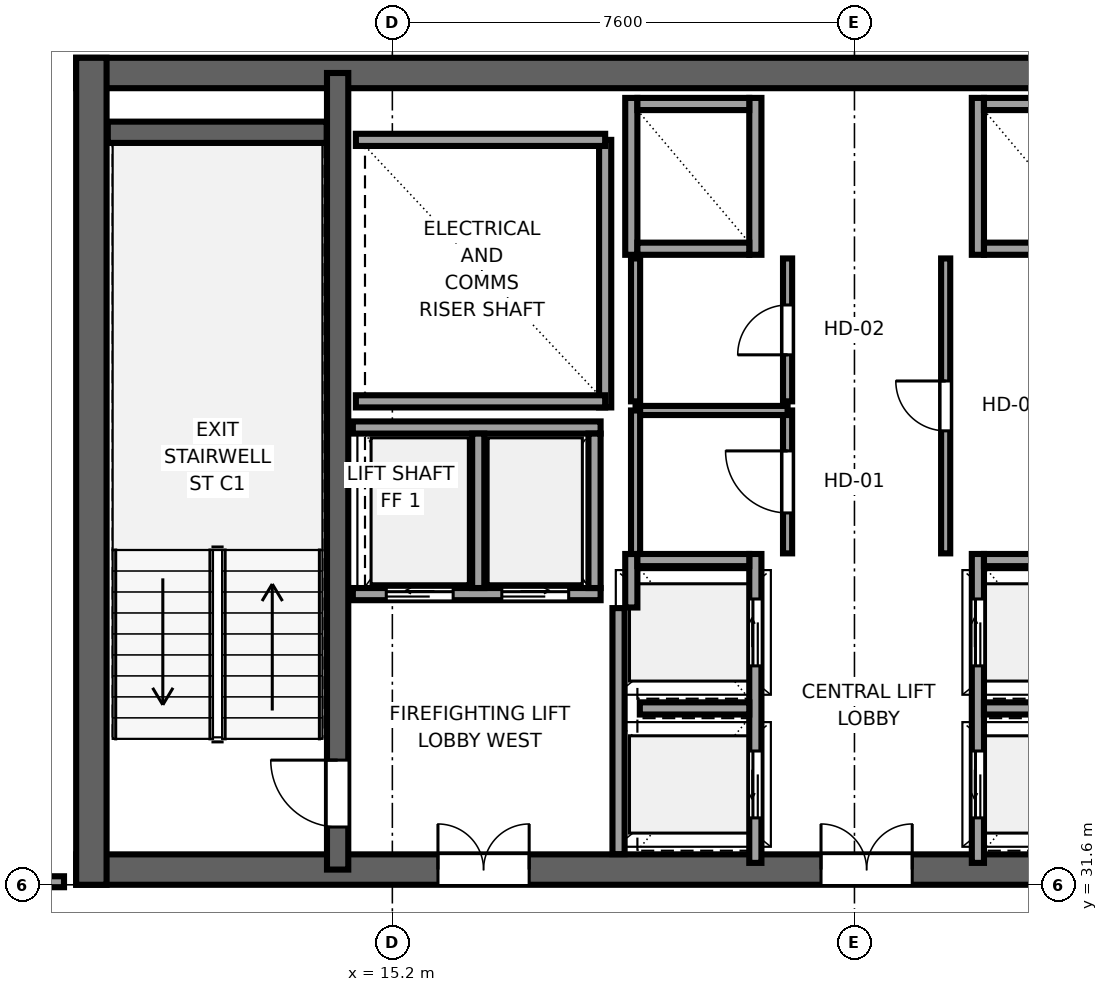
"""IFC4 building model, lengths in metres.
Left out: names, types, materials, properties, quantities, classifications, styles, units other than length and angle.
Written with IfcOpenShell. Run it as: python <this file> out.ifc"""

import sys

from ifc_helpers import new_model, si_unit, direction, frame, frame_2d, origin, place, context, subcontext, project, spatial, rectangle, extrude, source, transform, mapped, element, fill, save


model = new_model("IFC4")
c1 = context("Model", 3, precision=1e-05, world=origin(), true_north=direction((0.0, 1.0)))
c2 = subcontext(c1, "Body", "Model", "MODEL_VIEW")
j1 = project(units=[si_unit("LENGTHUNIT", "METRE"), si_unit("PLANEANGLEUNIT", "RADIAN")], contexts=[c1])
p1 = place(None, origin())
s1 = spatial("IfcSite", under=j1, at=p1, CompositionType="ELEMENT")
p2 = place(p1, origin())
s2 = spatial("IfcBuilding", under=s1, at=p2, CompositionType="ELEMENT")
p3 = place(p2, frame((0.0, 0.0, 223.9)))
s3 = spatial("IfcBuildingStorey", under=s2, at=p3, CompositionType="ELEMENT", Elevation=223.9)
p4 = place(p3, frame((10.0, 31.85, 0.0), z_axis=(0.0, 0.0, 1.0), x_axis=(1.0, 0.0, 0.0)))
e1 = element("IfcWall", 1, at=p4, inside=s3, PredefinedType="SHEAR", context=c2, shape_type="SweptSolid", body=[
    extrude(rectangle(XDim=26.0, YDim=0.5, at=frame_2d((13.0, 0.0))), origin(), (0.0, 0.0, 1.0), 3.55),
])
p5 = place(p4, frame((7.45, 0.0, 0.0), z_axis=(0.0, 0.0, 1.0), x_axis=(-1.0, 0.0, 0.0)))
e2 = element("IfcOpeningElement", 2, at=p5, cuts=e1, PredefinedType="OPENING", context=c2, shape_type="SweptSolid", body=[
    extrude(rectangle(XDim=1.5, YDim=2.04, at=frame_2d((0.75, 1.02))), frame((0.0, 0.26, 0.0), z_axis=(0.0, -1.0, 0.0), x_axis=(1.0, 0.0, 0.0)), (0.0, 0.0, 1.0), 0.52),
])
p6 = place(p4, frame((13.75, 0.0, 0.0), z_axis=(0.0, 0.0, 1.0), x_axis=(-1.0, 0.0, 0.0)))
e3 = element("IfcOpeningElement", 3, at=p6, cuts=e1, PredefinedType="OPENING", context=c2, shape_type="SweptSolid", body=[
    extrude(rectangle(XDim=1.5, YDim=2.04, at=frame_2d((0.75, 1.02))), frame((0.0, 0.26, 0.0), z_axis=(0.0, -1.0, 0.0), x_axis=(1.0, 0.0, 0.0)), (0.0, 0.0, 1.0), 0.52),
])
p7 = place(p4, frame((20.05, 0.0, 0.0), z_axis=(0.0, 0.0, 1.0), x_axis=(-1.0, 0.0, 0.0)))
e4 = element("IfcOpeningElement", 4, at=p7, cuts=e1, PredefinedType="OPENING", context=c2, shape_type="SweptSolid", body=[
    extrude(rectangle(XDim=1.5, YDim=2.04, at=frame_2d((0.75, 1.02))), frame((0.0, 0.26, 0.0), z_axis=(0.0, -1.0, 0.0), x_axis=(1.0, 0.0, 0.0)), (0.0, 0.0, 1.0), 0.52),
])
p8 = place(p3, frame((10.0, 44.95, 0.0), z_axis=(0.0, 0.0, 1.0), x_axis=(1.0, 0.0, 0.0)))
e5 = element("IfcWall", 5, at=p8, inside=s3, PredefinedType="SHEAR", context=c2, shape_type="SweptSolid", body=[
    extrude(rectangle(XDim=26.0, YDim=0.5, at=frame_2d((13.0, 0.0))), origin(), (0.0, 0.0, 1.0), 3.55),
])
p9 = place(p3, frame((10.25, 31.6, 0.0), z_axis=(0.0, 0.0, 1.0), x_axis=(0.0, 1.0, 0.0)))
e6 = element("IfcWall", 6, at=p9, inside=s3, PredefinedType="SHEAR", context=c2, shape_type="SweptSolid", body=[
    extrude(rectangle(XDim=13.6, YDim=0.5, at=frame_2d((6.8, 0.0))), origin(), (0.0, 0.0, 1.0), 3.55),
])
p10 = place(p3, frame((14.3, 31.85, 0.0), z_axis=(0.0, 0.0, 1.0), x_axis=(0.0, 1.0, 0.0)))
e7 = element("IfcWall", 7, at=p10, inside=s3, PredefinedType="SHEAR", context=c2, shape_type="SweptSolid", body=[
    extrude(rectangle(XDim=13.1, YDim=0.35, at=frame_2d((6.55, 0.0))), origin(), (0.0, 0.0, 1.0), 3.55),
])
p11 = place(p10, frame((0.7, 0.0, 0.0)))
e8 = element("IfcOpeningElement", 8, at=p11, cuts=e7, PredefinedType="OPENING", context=c2, shape_type="SweptSolid", body=[
    extrude(rectangle(XDim=1.1, YDim=2.12, at=frame_2d((0.55, 1.06))), frame((0.0, 0.185, 0.0), z_axis=(0.0, -1.0, 0.0), x_axis=(1.0, 0.0, 0.0)), (0.0, 0.0, 1.0), 0.37),
])
p12 = place(p3, frame((10.52, 43.975, 0.0), z_axis=(0.0, 0.0, 1.0), x_axis=(1.0, 0.0, 0.0)))
e9 = element("IfcWall", 9, at=p12, inside=s3, PredefinedType="SHEAR", context=c2, shape_type="SweptSolid", body=[
    extrude(rectangle(XDim=3.6, YDim=0.35, at=frame_2d((1.8, 0.0))), origin(), (0.0, 0.0, 1.0), 3.55),
])
p13 = place(p3, frame((18.7, 39.45, 0.0), z_axis=(0.0, 0.0, 1.0), x_axis=(0.0, 1.0, 0.0)))
e10 = element("IfcWall", 10, at=p13, inside=s3, PredefinedType="SOLIDWALL", context=c2, shape_type="SweptSolid", body=[
    extrude(rectangle(XDim=4.4, YDim=0.2, at=frame_2d((2.2, 0.0))), origin(), (0.0, 0.0, 1.0), 3.37),
])
for number, where, z_axis, x_axis in (
    (11, (14.6, 39.55, 0.0), (0.0, 0.0, 1.0), (1.0, 0.0, 0.0)),
    (12, (14.6, 43.85, 0.0), (0.0, 0.0, 1.0), (1.0, 0.0, 0.0)),
):
    element("IfcWall", number, at=place(p3, frame(where, z_axis=z_axis, x_axis=x_axis)), inside=s3, PredefinedType="SOLIDWALL", context=c2, shape_type="SweptSolid", body=[
        extrude(rectangle(XDim=4.1, YDim=0.2, at=frame_2d((2.05, 0.0))), origin(), (0.0, 0.0, 1.0), 3.37),
    ])
p14 = place(p3, frame((18.92, 32.104, 0.0), z_axis=(0.0, 0.0, 1.0), x_axis=(0.0, 1.0, 0.0)))
e13 = element("IfcWall", 13, at=p14, inside=s3, PredefinedType="SOLIDWALL", context=c2, shape_type="SweptSolid", body=[
    extrude(rectangle(XDim=4.046, YDim=0.2, at=frame_2d((2.023, 0.0))), origin(), (0.0, 0.0, 1.0), 3.37),
])
p15 = place(p3, frame((21.17, 31.96, 0.0), z_axis=(0.0, 0.0, 1.0), x_axis=(0.0, 1.0, 0.0)))
e14 = element("IfcWall", 14, at=p15, inside=s3, PredefinedType="SOLIDWALL", context=c2, shape_type="SweptSolid", body=[
    extrude(rectangle(XDim=5.08, YDim=0.2, at=frame_2d((2.54, 0.0))), origin(), (0.0, 0.0, 1.0), 3.37),
])
p16 = place(p15, frame((0.74, 0.0, 0.0)))
e15 = element("IfcOpeningElement", 15, at=p16, cuts=e14, PredefinedType="OPENING", context=c2, shape_type="SweptSolid", body=[
    extrude(rectangle(XDim=1.1, YDim=2.12, at=frame_2d((0.55, 1.06))), frame((0.0, 0.11, 0.0), z_axis=(0.0, -1.0, 0.0), x_axis=(1.0, 0.0, 0.0)), (0.0, 0.0, 1.0), 0.22),
])
p17 = place(p15, frame((3.24, 0.0, 0.0)))
e16 = element("IfcOpeningElement", 16, at=p17, cuts=e14, PredefinedType="OPENING", context=c2, shape_type="SweptSolid", body=[
    extrude(rectangle(XDim=1.1, YDim=2.12, at=frame_2d((0.55, 1.06))), frame((0.0, 0.11, 0.0), z_axis=(0.0, -1.0, 0.0), x_axis=(1.0, 0.0, 0.0)), (0.0, 0.0, 1.0), 0.22),
])
p18 = place(p3, frame((19.13, 36.16, 0.0), z_axis=(0.0, 0.0, 1.0), x_axis=(0.0, 1.0, 0.0)))
e17 = element("IfcWall", 17, at=p18, inside=s3, PredefinedType="SOLIDWALL", context=c2, shape_type="SweptSolid", body=[
    extrude(rectangle(XDim=0.88, YDim=0.2, at=frame_2d((0.44, 0.0))), origin(), (0.0, 0.0, 1.0), 3.37),
])
p19 = place(p3, frame((19.23, 36.94, 0.0), z_axis=(0.0, 0.0, 1.0), x_axis=(1.0, 0.0, 0.0)))
e18 = element("IfcWall", 18, at=p19, inside=s3, PredefinedType="SOLIDWALL", context=c2, shape_type="SweptSolid", body=[
    extrude(rectangle(XDim=1.84, YDim=0.2, at=frame_2d((0.92, 0.0))), origin(), (0.0, 0.0, 1.0), 3.37),
])
p20 = place(p3, frame((19.27, 34.5, 0.0), z_axis=(0.0, 0.0, 1.0), x_axis=(1.0, 0.0, 0.0)))
e19 = element("IfcWall", 19, at=p20, inside=s3, PredefinedType="SOLIDWALL", context=c2, shape_type="SweptSolid", body=[
    extrude(rectangle(XDim=1.8, YDim=0.2, at=frame_2d((0.9, 0.0))), origin(), (0.0, 0.0, 1.0), 3.37),
])
for number, where, z_axis, x_axis in (
    (20, (21.17, 41.96, 0.0), (0.0, 0.0, 1.0), (0.0, 1.0, 0.0)),
    (21, (19.13, 41.96, 0.0), (0.0, 0.0, 1.0), (0.0, 1.0, 0.0)),
):
    element("IfcWall", number, at=place(p3, frame(where, z_axis=z_axis, x_axis=x_axis)), inside=s3, PredefinedType="SOLIDWALL", context=c2, shape_type="SweptSolid", body=[
        extrude(rectangle(XDim=2.58, YDim=0.2, at=frame_2d((1.29, 0.0))), origin(), (0.0, 0.0, 1.0), 3.37),
    ])
for number, where, z_axis, x_axis in (
    (22, (19.23, 42.06, 0.0), (0.0, 0.0, 1.0), (1.0, 0.0, 0.0)),
    (23, (19.23, 44.44, 0.0), (0.0, 0.0, 1.0), (1.0, 0.0, 0.0)),
):
    element("IfcWall", number, at=place(p3, frame(where, z_axis=z_axis, x_axis=x_axis)), inside=s3, PredefinedType="SOLIDWALL", context=c2, shape_type="SweptSolid", body=[
        extrude(rectangle(XDim=1.84, YDim=0.2, at=frame_2d((0.92, 0.0))), origin(), (0.0, 0.0, 1.0), 3.37),
    ])
p21 = place(p3, frame((14.55, 36.38, 0.0), z_axis=(0.0, 0.0, 1.0), x_axis=(1.0, 0.0, 0.0)))
e24 = element("IfcWall", 24, at=p21, inside=s3, PredefinedType="SOLIDWALL", context=c2, shape_type="SweptSolid", body=[
    extrude(rectangle(XDim=4.075, YDim=0.2, at=frame_2d((2.038, 0.0))), origin(), (0.0, 0.0, 1.0), 3.37),
])
p22 = place(p21, frame((0.55, 0.0, 0.0)))
e25 = element("IfcOpeningElement", 25, at=p22, cuts=e24, PredefinedType="OPENING", context=c2, shape_type="SweptSolid", body=[
    extrude(rectangle(XDim=1.1, YDim=2.12, at=frame_2d((0.55, 1.06))), frame((0.0, 0.11, 0.0), z_axis=(0.0, -1.0, 0.0), x_axis=(1.0, 0.0, 0.0)), (0.0, 0.0, 1.0), 0.22),
])
p23 = place(p21, frame((2.45, 0.0, 0.0)))
e26 = element("IfcOpeningElement", 26, at=p23, cuts=e24, PredefinedType="OPENING", context=c2, shape_type="SweptSolid", body=[
    extrude(rectangle(XDim=1.1, YDim=2.12, at=frame_2d((0.55, 1.06))), frame((0.0, 0.11, 0.0), z_axis=(0.0, -1.0, 0.0), x_axis=(1.0, 0.0, 0.0)), (0.0, 0.0, 1.0), 0.22),
])
p24 = place(p3, frame((14.55, 39.12, 0.0), z_axis=(0.0, 0.0, 1.0), x_axis=(1.0, 0.0, 0.0)))
e27 = element("IfcWall", 27, at=p24, inside=s3, PredefinedType="SOLIDWALL", context=c2, shape_type="SweptSolid", body=[
    extrude(rectangle(XDim=4.075, YDim=0.2, at=frame_2d((2.038, 0.0))), origin(), (0.0, 0.0, 1.0), 3.37),
])
for number, where, z_axis, x_axis in (
    (28, (18.525, 36.48, 0.0), (0.0, 0.0, 1.0), (0.0, 1.0, 0.0)),
    (29, (16.613, 36.48, 0.0), (0.0, 0.0, 1.0), (0.0, 1.0, 0.0)),
):
    element("IfcWall", number, at=place(p3, frame(where, z_axis=z_axis, x_axis=x_axis)), inside=s3, PredefinedType="SOLIDWALL", context=c2, shape_type="SweptSolid", body=[
        extrude(rectangle(XDim=2.54, YDim=0.2, at=frame_2d((1.27, 0.0))), origin(), (0.0, 0.0, 1.0), 3.37),
    ])
p25 = place(p3, frame((24.83, 31.96, 0.0), z_axis=(0.0, 0.0, 1.0), x_axis=(0.0, 1.0, 0.0)))
e30 = element("IfcWall", 30, at=p25, inside=s3, PredefinedType="SOLIDWALL", context=c2, shape_type="SweptSolid", body=[
    extrude(rectangle(XDim=5.08, YDim=0.2, at=frame_2d((2.54, 0.0))), origin(), (0.0, 0.0, 1.0), 3.37),
])
p26 = place(p25, frame((0.74, 0.0, 0.0)))
e31 = element("IfcOpeningElement", 31, at=p26, cuts=e30, PredefinedType="OPENING", context=c2, shape_type="SweptSolid", body=[
    extrude(rectangle(XDim=1.1, YDim=2.12, at=frame_2d((0.55, 1.06))), frame((0.0, 0.11, 0.0), z_axis=(0.0, -1.0, 0.0), x_axis=(1.0, 0.0, 0.0)), (0.0, 0.0, 1.0), 0.22),
])
p27 = place(p25, frame((3.24, 0.0, 0.0)))
e32 = element("IfcOpeningElement", 32, at=p27, cuts=e30, PredefinedType="OPENING", context=c2, shape_type="SweptSolid", body=[
    extrude(rectangle(XDim=1.1, YDim=2.12, at=frame_2d((0.55, 1.06))), frame((0.0, 0.11, 0.0), z_axis=(0.0, -1.0, 0.0), x_axis=(1.0, 0.0, 0.0)), (0.0, 0.0, 1.0), 0.22),
])
p28 = place(p3, frame((24.93, 36.94, 0.0), z_axis=(0.0, 0.0, 1.0), x_axis=(1.0, 0.0, 0.0)))
e33 = element("IfcWall", 33, at=p28, inside=s3, PredefinedType="SOLIDWALL", context=c2, shape_type="SweptSolid", body=[
    extrude(rectangle(XDim=1.84, YDim=0.2, at=frame_2d((0.92, 0.0))), origin(), (0.0, 0.0, 1.0), 3.37),
])
p29 = place(p3, frame((24.93, 34.5, 0.0), z_axis=(0.0, 0.0, 1.0), x_axis=(1.0, 0.0, 0.0)))
e34 = element("IfcWall", 34, at=p29, inside=s3, PredefinedType="SOLIDWALL", context=c2, shape_type="SweptSolid", body=[
    extrude(rectangle(XDim=1.8, YDim=0.2, at=frame_2d((0.9, 0.0))), origin(), (0.0, 0.0, 1.0), 3.37),
])
p30 = place(p3, frame((24.83, 41.96, 0.0), z_axis=(0.0, 0.0, 1.0), x_axis=(0.0, 1.0, 0.0)))
e35 = element("IfcWall", 35, at=p30, inside=s3, PredefinedType="SOLIDWALL", context=c2, shape_type="SweptSolid", body=[
    extrude(rectangle(XDim=2.58, YDim=0.2, at=frame_2d((1.29, 0.0))), origin(), (0.0, 0.0, 1.0), 3.37),
])
for number, where, z_axis, x_axis in (
    (36, (24.93, 42.06, 0.0), (0.0, 0.0, 1.0), (1.0, 0.0, 0.0)),
    (37, (24.93, 44.44, 0.0), (0.0, 0.0, 1.0), (1.0, 0.0, 0.0)),
):
    element("IfcWall", number, at=place(p3, frame(where, z_axis=z_axis, x_axis=x_axis)), inside=s3, PredefinedType="SOLIDWALL", context=c2, shape_type="SweptSolid", body=[
        extrude(rectangle(XDim=1.84, YDim=0.2, at=frame_2d((0.92, 0.0))), origin(), (0.0, 0.0, 1.0), 3.37),
    ])
p31 = place(p3, frame((21.7, 37.05, 0.0), z_axis=(0.0, 0.0, 1.0), x_axis=(0.0, 1.0, 0.0)))
e38 = element("IfcWall", 38, at=p31, inside=s3, PredefinedType="PARTITIONING", context=c2, shape_type="SweptSolid", body=[
    extrude(rectangle(XDim=2.35, YDim=0.15, at=frame_2d((1.175, 0.0))), origin(), (0.0, 0.0, 1.0), 3.37),
])
p32 = place(p31, frame((0.665, 0.0, 0.0)))
e39 = element("IfcOpeningElement", 39, at=p32, cuts=e38, PredefinedType="OPENING", context=c2, shape_type="SweptSolid", body=[
    extrude(rectangle(XDim=1.02, YDim=2.03, at=frame_2d((0.51, 1.015))), frame((0.0, 0.085, 0.0), z_axis=(0.0, -1.0, 0.0), x_axis=(1.0, 0.0, 0.0)), (0.0, 0.0, 1.0), 0.17),
])
p33 = place(p3, frame((19.2, 39.4, 0.0), z_axis=(0.0, 0.0, 1.0), x_axis=(1.0, 0.0, 0.0)))
e40 = element("IfcWall", 40, at=p33, inside=s3, PredefinedType="PARTITIONING", context=c2, shape_type="SweptSolid", body=[
    extrude(rectangle(XDim=2.5, YDim=0.15, at=frame_2d((1.25, 0.0))), origin(), (0.0, 0.0, 1.0), 3.37),
])
p34 = place(p3, frame((19.2, 37.04, 0.0), z_axis=(0.0, 0.0, 1.0), x_axis=(0.0, 1.0, 0.0)))
e41 = element("IfcWall", 41, at=p34, inside=s3, PredefinedType="PARTITIONING", context=c2, shape_type="SweptSolid", body=[
    extrude(rectangle(XDim=2.36, YDim=0.15, at=frame_2d((1.18, 0.0))), origin(), (0.0, 0.0, 1.0), 3.37),
])
p35 = place(p3, frame((21.7, 39.55, 0.0), z_axis=(0.0, 0.0, 1.0), x_axis=(0.0, 1.0, 0.0)))
e42 = element("IfcWall", 42, at=p35, inside=s3, PredefinedType="PARTITIONING", context=c2, shape_type="SweptSolid", body=[
    extrude(rectangle(XDim=2.35, YDim=0.15, at=frame_2d((1.175, 0.0))), origin(), (0.0, 0.0, 1.0), 3.37),
])
p36 = place(p35, frame((0.765, 0.0, 0.0)))
e43 = element("IfcOpeningElement", 43, at=p36, cuts=e42, PredefinedType="OPENING", context=c2, shape_type="SweptSolid", body=[
    extrude(rectangle(XDim=0.82, YDim=2.01, at=frame_2d((0.41, 1.005))), frame((0.0, 0.085, 0.0), z_axis=(0.0, -1.0, 0.0), x_axis=(1.0, 0.0, 0.0)), (0.0, 0.0, 1.0), 0.17),
])
p37 = place(p3, frame((19.2, 39.55, 0.0), z_axis=(0.0, 0.0, 1.0), x_axis=(0.0, 1.0, 0.0)))
e44 = element("IfcWall", 44, at=p37, inside=s3, PredefinedType="PARTITIONING", context=c2, shape_type="SweptSolid", body=[
    extrude(rectangle(XDim=2.35, YDim=0.15, at=frame_2d((1.175, 0.0))), origin(), (0.0, 0.0, 1.0), 3.37),
])
p38 = place(p3, frame((24.3, 37.05, 0.0), z_axis=(0.0, 0.0, 1.0), x_axis=(0.0, 1.0, 0.0)))
e45 = element("IfcWall", 45, at=p38, inside=s3, PredefinedType="PARTITIONING", context=c2, shape_type="SweptSolid", body=[
    extrude(rectangle(XDim=4.85, YDim=0.15, at=frame_2d((2.425, 0.0))), origin(), (0.0, 0.0, 1.0), 3.37),
])
p39 = place(p38, frame((2.015, 0.0, 0.0)))
e46 = element("IfcOpeningElement", 46, at=p39, cuts=e45, PredefinedType="OPENING", context=c2, shape_type="SweptSolid", body=[
    extrude(rectangle(XDim=0.82, YDim=2.01, at=frame_2d((0.41, 1.005))), frame((0.0, 0.085, 0.0), z_axis=(0.0, -1.0, 0.0), x_axis=(1.0, 0.0, 0.0)), (0.0, 0.0, 1.0), 0.17),
])
p40 = place(p3, frame((2.9, 31.65, 0.0), z_axis=(0.0, 0.0, 1.0), x_axis=(1.0, 0.0, 0.0)))
e47 = element("IfcWall", 47, at=p40, inside=s3, PredefinedType="PARTITIONING", context=c2, shape_type="SweptSolid", body=[
    extrude(rectangle(XDim=6.9, YDim=0.18, at=frame_2d((3.45, 0.0))), origin(), (0.0, 0.0, 1.0), 3.37),
])
p41 = place(p40, frame((2.625, 0.0, 0.0)))
e48 = element("IfcOpeningElement", 48, at=p41, cuts=e47, PredefinedType="OPENING", context=c2, shape_type="SweptSolid", body=[
    extrude(rectangle(XDim=1.65, YDim=2.15, at=frame_2d((0.825, 1.075))), frame((0.0, 0.1, 0.0), z_axis=(0.0, -1.0, 0.0), x_axis=(1.0, 0.0, 0.0)), (0.0, 0.0, 1.0), 0.2),
])
m1 = source(origin(), c2, "Body", "SweptSolid", [
    extrude(rectangle(XDim=1.1, YDim=2.12, at=frame_2d((0.55, 1.06))), frame((0.0, 0.025, 0.0), z_axis=(0.0, -1.0, 0.0), x_axis=(1.0, 0.0, 0.0)), (0.0, 0.0, 1.0), 0.05),
])
p42 = place(p11, origin())
e49 = element("IfcDoor", 49, at=p42, inside=s3, OperationType="SINGLE_SWING_RIGHT", PredefinedType="DOOR", context=c2, shape_type="MappedRepresentation", body=[
    mapped(m1, transform((0.0, 0.0, 0.0), x_axis=(1.0, 0.0, 0.0), y_axis=(0.0, 1.0, 0.0), z_axis=(0.0, 0.0, 1.0), scale=1.0)),
])
fill(e8, e49)
m2 = source(origin(), c2, "Body", "SweptSolid", [
    extrude(rectangle(XDim=1.5, YDim=2.04, at=frame_2d((0.75, 1.02))), frame((0.0, 0.025, 0.0), z_axis=(0.0, -1.0, 0.0), x_axis=(1.0, 0.0, 0.0)), (0.0, 0.0, 1.0), 0.05),
])
p43 = place(p5, origin())
e50 = element("IfcDoor", 50, at=p43, inside=s3, OperationType="DOUBLE_DOOR_SINGLE_SWING", PredefinedType="DOOR", context=c2, shape_type="MappedRepresentation", body=[
    mapped(m2, transform((0.0, 0.0, 0.0), x_axis=(1.0, 0.0, 0.0), y_axis=(0.0, 1.0, 0.0), z_axis=(0.0, 0.0, 1.0), scale=1.0)),
])
fill(e2, e50)
p44 = place(p6, origin())
e51 = element("IfcDoor", 51, at=p44, inside=s3, OperationType="DOUBLE_DOOR_SINGLE_SWING", PredefinedType="DOOR", context=c2, shape_type="MappedRepresentation", body=[
    mapped(m2, transform((0.0, 0.0, 0.0), x_axis=(1.0, 0.0, 0.0), y_axis=(0.0, 1.0, 0.0), z_axis=(0.0, 0.0, 1.0), scale=1.0)),
])
fill(e3, e51)
m3 = source(origin(), c2, "Body", "SweptSolid", [
    extrude(rectangle(XDim=1.1, YDim=2.12, at=frame_2d((0.55, 1.06))), frame((0.0, 0.025, 0.0), z_axis=(0.0, -1.0, 0.0), x_axis=(1.0, 0.0, 0.0)), (0.0, 0.0, 1.0), 0.05),
])
p45 = place(p16, origin())
e52 = element("IfcDoor", 52, at=p45, inside=s3, OperationType="SLIDING_TO_LEFT", PredefinedType="DOOR", context=c2, shape_type="MappedRepresentation", body=[
    mapped(m3, transform((0.0, 0.0, 0.0), x_axis=(1.0, 0.0, 0.0), y_axis=(0.0, 1.0, 0.0), z_axis=(0.0, 0.0, 1.0), scale=1.0)),
])
fill(e15, e52)
p46 = place(p17, origin())
e53 = element("IfcDoor", 53, at=p46, inside=s3, OperationType="SLIDING_TO_RIGHT", PredefinedType="DOOR", context=c2, shape_type="MappedRepresentation", body=[
    mapped(m3, transform((0.0, 0.0, 0.0), x_axis=(1.0, 0.0, 0.0), y_axis=(0.0, 1.0, 0.0), z_axis=(0.0, 0.0, 1.0), scale=1.0)),
])
fill(e16, e53)
p47 = place(p22, origin())
e54 = element("IfcDoor", 54, at=p47, inside=s3, OperationType="SLIDING_TO_LEFT", PredefinedType="DOOR", context=c2, shape_type="MappedRepresentation", body=[
    mapped(m3, transform((0.0, 0.0, 0.0), x_axis=(1.0, 0.0, 0.0), y_axis=(0.0, 1.0, 0.0), z_axis=(0.0, 0.0, 1.0), scale=1.0)),
])
fill(e25, e54)
p48 = place(p23, origin())
e55 = element("IfcDoor", 55, at=p48, inside=s3, OperationType="SLIDING_TO_RIGHT", PredefinedType="DOOR", context=c2, shape_type="MappedRepresentation", body=[
    mapped(m3, transform((0.0, 0.0, 0.0), x_axis=(1.0, 0.0, 0.0), y_axis=(0.0, 1.0, 0.0), z_axis=(0.0, 0.0, 1.0), scale=1.0)),
])
fill(e26, e55)
p49 = place(p26, origin())
e56 = element("IfcDoor", 56, at=p49, inside=s3, OperationType="SLIDING_TO_LEFT", PredefinedType="DOOR", context=c2, shape_type="MappedRepresentation", body=[
    mapped(m3, transform((0.0, 0.0, 0.0), x_axis=(1.0, 0.0, 0.0), y_axis=(0.0, 1.0, 0.0), z_axis=(0.0, 0.0, 1.0), scale=1.0)),
])
fill(e31, e56)
p50 = place(p27, origin())
e57 = element("IfcDoor", 57, at=p50, inside=s3, OperationType="SLIDING_TO_RIGHT", PredefinedType="DOOR", context=c2, shape_type="MappedRepresentation", body=[
    mapped(m3, transform((0.0, 0.0, 0.0), x_axis=(1.0, 0.0, 0.0), y_axis=(0.0, 1.0, 0.0), z_axis=(0.0, 0.0, 1.0), scale=1.0)),
])
fill(e32, e57)
m4 = source(origin(), c2, "Body", "SweptSolid", [
    extrude(rectangle(XDim=1.02, YDim=2.03, at=frame_2d((0.51, 1.015))), frame((0.0, 0.025, 0.0), z_axis=(0.0, -1.0, 0.0), x_axis=(1.0, 0.0, 0.0)), (0.0, 0.0, 1.0), 0.05),
])
p51 = place(p32, origin())
e58 = element("IfcDoor", 58, at=p51, inside=s3, OperationType="SINGLE_SWING_RIGHT", PredefinedType="DOOR", context=c2, shape_type="MappedRepresentation", body=[
    mapped(m4, transform((0.0, 0.0, 0.0), x_axis=(1.0, 0.0, 0.0), y_axis=(0.0, 1.0, 0.0), z_axis=(0.0, 0.0, 1.0), scale=1.0)),
])
fill(e39, e58)
m5 = source(origin(), c2, "Body", "SweptSolid", [
    extrude(rectangle(XDim=0.82, YDim=2.01, at=frame_2d((0.41, 1.005))), frame((0.0, 0.025, 0.0), z_axis=(0.0, -1.0, 0.0), x_axis=(1.0, 0.0, 0.0)), (0.0, 0.0, 1.0), 0.05),
])
p52 = place(p36, origin())
e59 = element("IfcDoor", 59, at=p52, inside=s3, OperationType="SINGLE_SWING_LEFT", PredefinedType="DOOR", context=c2, shape_type="MappedRepresentation", body=[
    mapped(m5, transform((0.0, 0.0, 0.0), x_axis=(1.0, 0.0, 0.0), y_axis=(0.0, 1.0, 0.0), z_axis=(0.0, 0.0, 1.0), scale=1.0)),
])
fill(e43, e59)
p53 = place(p39, origin())
e60 = element("IfcDoor", 60, at=p53, inside=s3, OperationType="SINGLE_SWING_RIGHT", PredefinedType="DOOR", context=c2, shape_type="MappedRepresentation", body=[
    mapped(m5, transform((0.0, 0.0, 0.0), x_axis=(1.0, 0.0, 0.0), y_axis=(0.0, 1.0, 0.0), z_axis=(0.0, 0.0, 1.0), scale=1.0)),
])
fill(e46, e60)
save(model, sys.argv[1])
